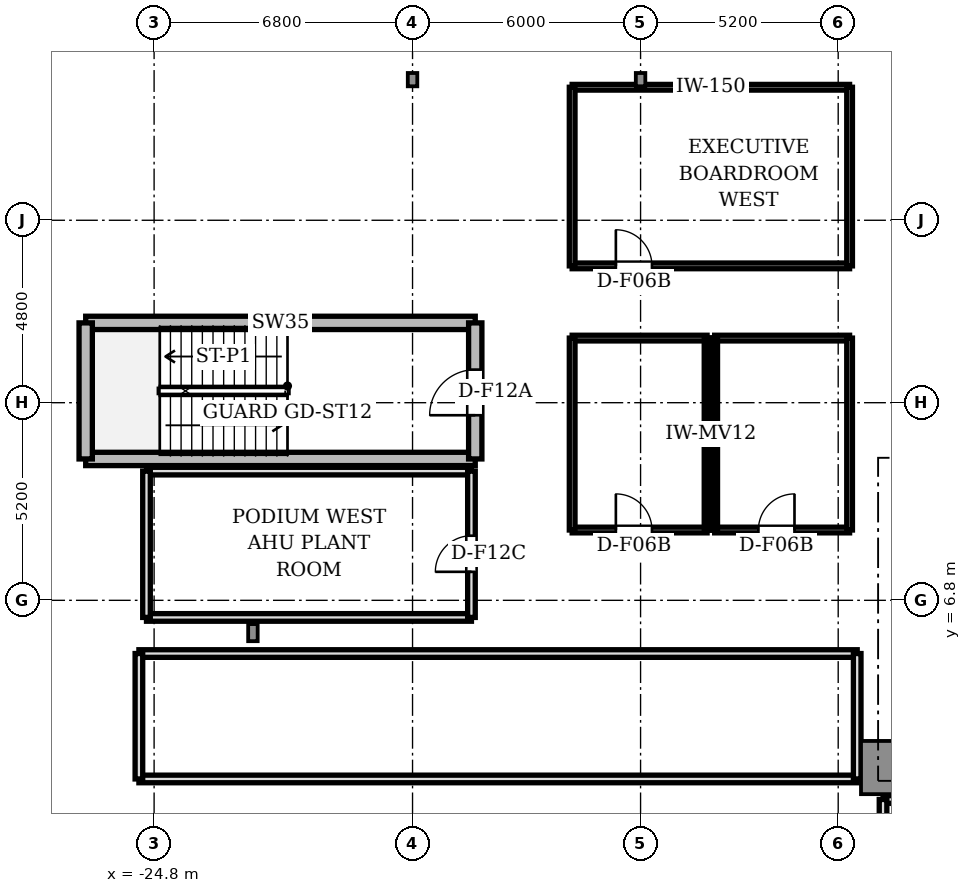
"""IFC4 building model, lengths in metres.
Left out: names, types, materials, properties, quantities, classifications, styles, units other than length and angle.
Written with IfcOpenShell. Run it as: python <this file> out.ifc"""

import sys

from ifc_helpers import new_model, si_unit, direction, frame, frame_2d, origin, origin_2d, place, context, subcontext, project, spatial, rectangle, i_section, extrude, source, transform, mapped, element, fill, save


model = new_model("IFC4")
c1 = context("Model", 3, precision=1e-05, world=origin(), true_north=direction((0.0, 1.0)))
c2 = subcontext(c1, "Body", "Model", "MODEL_VIEW")
j1 = project(units=[si_unit("LENGTHUNIT", "METRE"), si_unit("PLANEANGLEUNIT", "RADIAN")], contexts=[c1])
p1 = place(None, origin())
s1 = spatial("IfcSite", under=j1, at=p1, CompositionType="ELEMENT")
p2 = place(p1, origin())
s2 = spatial("IfcBuilding", under=s1, at=p2, CompositionType="ELEMENT")
p3 = place(p2, frame((0.0, 0.0, 14.1)))
s3 = spatial("IfcBuildingStorey", under=s2, at=p3, CompositionType="ELEMENT", Elevation=14.1)
m1 = source(origin(), c2, "Body", "SweptSolid", [
    extrude(rectangle(XDim=1.4, YDim=1.4, at=origin_2d()), origin(), (0.0, 0.0, 1.0), 4.18),
])
p4 = place(p3, frame((-5.5, 2.4, 0.0), z_axis=(0.0, 0.0, 1.0), x_axis=(1.0, 0.0, 0.0)))
e1 = element("IfcColumn", 1, at=p4, inside=s3, PredefinedType="COLUMN", context=c2, shape_type="MappedRepresentation", body=[
    mapped(m1, transform((0.0, 0.0, 0.0), scale=1.0)),
])
m2 = source(origin(), c2, "Body", "SweptSolid", [
    extrude(i_section(OverallWidth=0.25, OverallDepth=0.45, WebThickness=0.014, FlangeThickness=0.014, FilletRadius=0.015, at=origin_2d()), origin(), (0.0, 0.0, 1.0), 4.18),
])
p5 = place(p3, frame((-22.2, 5.95, 0.0), z_axis=(0.0, 0.0, 1.0), x_axis=(1.0, 0.0, 0.0)))
e2 = element("IfcColumn", 2, at=p5, inside=s3, PredefinedType="COLUMN", context=c2, shape_type="MappedRepresentation", body=[
    mapped(m2, transform((0.0, 0.0, 0.0), scale=1.0)),
])
m3 = source(origin(), c2, "Body", "SweptSolid", [
    extrude(i_section(OverallWidth=0.25, OverallDepth=0.35, WebThickness=0.012, FlangeThickness=0.012, FilletRadius=0.012, at=origin_2d()), origin(), (0.0, 0.0, 1.0), 4.18),
])
for number, where, z_axis, x_axis in (
    (3, (-18.0, 20.5, 0.0), (0.0, 0.0, 1.0), (1.0, 0.0, 0.0)),
    (4, (-12.0, 20.5, 0.0), (0.0, 0.0, 1.0), (1.0, 0.0, 0.0)),
):
    element("IfcColumn", number, at=place(p3, frame(where, z_axis=z_axis, x_axis=x_axis)), inside=s3, PredefinedType="COLUMN", context=c2, shape_type="MappedRepresentation", body=[
        mapped(m3, transform((0.0, 0.0, 0.0), scale=1.0)),
    ])
p6 = place(p3, frame((-5.62, 1.56, 0.0), z_axis=(0.0, 0.0, 1.0), x_axis=(1.0, 0.0, 0.0)))
e5 = element("IfcWall", 5, at=p6, inside=s3, PredefinedType="SOLIDWALL", context=c2, shape_type="SweptSolid", body=[
    extrude(rectangle(XDim=1.64, YDim=0.2, at=frame_2d((0.82, 0.0))), origin(), (0.0, 0.0, 1.0), 3.73),
])
p7 = place(p3, frame((-5.62, 0.0, 0.0), z_axis=(0.0, 0.0, 1.0), x_axis=(0.0, 1.0, 0.0)))
e6 = element("IfcWall", 6, at=p7, inside=s3, PredefinedType="SOLIDWALL", context=c2, shape_type="SweptSolid", body=[
    extrude(rectangle(XDim=1.56, YDim=0.2, at=frame_2d((0.78, 0.0))), origin(), (0.0, 0.0, 1.0), 3.73),
])
for number, where, z_axis, x_axis in (
    (7, (-26.6, 14.1, 0.0), (0.0, 0.0, 1.0), (1.0, 0.0, 0.0)),
    (8, (-26.6, 10.52, 0.0), (0.0, 0.0, 1.0), (1.0, 0.0, 0.0)),
):
    element("IfcWall", number, at=place(p3, frame(where, z_axis=z_axis, x_axis=x_axis)), inside=s3, PredefinedType="SHEAR", context=c2, shape_type="SweptSolid", body=[
        extrude(rectangle(XDim=10.25, YDim=0.35, at=frame_2d((5.125, 0.0))), origin(), (0.0, 0.0, 1.0), 4.18),
    ])
p8 = place(p3, frame((-26.6, 10.52, 0.0), z_axis=(0.0, 0.0, 1.0), x_axis=(0.0, 1.0, 0.0)))
e9 = element("IfcWall", 9, at=p8, inside=s3, PredefinedType="SHEAR", context=c2, shape_type="SweptSolid", body=[
    extrude(rectangle(XDim=3.58, YDim=0.35, at=frame_2d((1.79, 0.0))), origin(), (0.0, 0.0, 1.0), 4.18),
])
p9 = place(p3, frame((-16.35, 10.52, 0.0), z_axis=(0.0, 0.0, 1.0), x_axis=(0.0, 1.0, 0.0)))
e10 = element("IfcWall", 10, at=p9, inside=s3, PredefinedType="SHEAR", context=c2, shape_type="SweptSolid", body=[
    extrude(rectangle(XDim=3.58, YDim=0.35, at=frame_2d((1.79, 0.0))), origin(), (0.0, 0.0, 1.0), 4.18),
])
p10 = place(p9, frame((1.15, 0.0, 0.0)))
e11 = element("IfcOpeningElement", 11, at=p10, cuts=e10, PredefinedType="OPENING", context=c2, shape_type="SweptSolid", body=[
    extrude(rectangle(XDim=1.2, YDim=2.2, at=frame_2d((0.6, 1.1))), frame((0.0, 0.185, 0.0), z_axis=(0.0, -1.0, 0.0), x_axis=(1.0, 0.0, 0.0)), (0.0, 0.0, 1.0), 0.37),
])
for number, where, z_axis, x_axis in (
    (12, (-25.2, 5.4, 0.0), (0.0, 0.0, 1.0), (1.0, 0.0, 0.0)),
    (13, (-25.2, 2.1, 0.0), (0.0, 0.0, 1.0), (1.0, 0.0, 0.0)),
):
    element("IfcWall", number, at=place(p3, frame(where, z_axis=z_axis, x_axis=x_axis)), inside=s3, PredefinedType="SOLIDWALL", context=c2, shape_type="SweptSolid", body=[
        extrude(rectangle(XDim=18.9, YDim=0.2, at=frame_2d((9.45, 0.0))), origin(), (0.0, 0.0, 1.0), 3.25),
    ])
for number, where, z_axis, x_axis in (
    (14, (-25.2, 2.1, 0.0), (0.0, 0.0, 1.0), (0.0, 1.0, 0.0)),
    (15, (-6.3, 2.1, 0.0), (0.0, 0.0, 1.0), (0.0, 1.0, 0.0)),
):
    element("IfcWall", number, at=place(p3, frame(where, z_axis=z_axis, x_axis=x_axis)), inside=s3, PredefinedType="SOLIDWALL", context=c2, shape_type="SweptSolid", body=[
        extrude(rectangle(XDim=3.3, YDim=0.2, at=frame_2d((1.65, 0.0))), origin(), (0.0, 0.0, 1.0), 3.73),
    ])
p11 = place(p3, frame((-25.0, 10.2, 0.0), z_axis=(0.0, 0.0, 1.0), x_axis=(1.0, 0.0, 0.0)))
e16 = element("IfcWall", 16, at=p11, inside=s3, PredefinedType="SOLIDWALL", context=c2, shape_type="SweptSolid", body=[
    extrude(rectangle(XDim=8.55, YDim=0.2, at=frame_2d((4.275, 0.0))), origin(), (0.0, 0.0, 1.0), 3.73),
])
p12 = place(p3, frame((-25.0, 6.35, 0.0), z_axis=(0.0, 0.0, 1.0), x_axis=(1.0, 0.0, 0.0)))
e17 = element("IfcWall", 17, at=p12, inside=s3, PredefinedType="SOLIDWALL", context=c2, shape_type="SweptSolid", body=[
    extrude(rectangle(XDim=8.55, YDim=0.2, at=frame_2d((4.275, 0.0))), origin(), (0.0, 0.0, 1.0), 3.25),
])
p13 = place(p3, frame((-25.0, 6.35, 0.0), z_axis=(0.0, 0.0, 1.0), x_axis=(0.0, 1.0, 0.0)))
e18 = element("IfcWall", 18, at=p13, inside=s3, PredefinedType="SOLIDWALL", context=c2, shape_type="SweptSolid", body=[
    extrude(rectangle(XDim=3.85, YDim=0.2, at=frame_2d((1.925, 0.0))), origin(), (0.0, 0.0, 1.0), 3.73),
])
p14 = place(p3, frame((-16.45, 6.35, 0.0), z_axis=(0.0, 0.0, 1.0), x_axis=(0.0, 1.0, 0.0)))
e19 = element("IfcWall", 19, at=p14, inside=s3, PredefinedType="SOLIDWALL", context=c2, shape_type="SweptSolid", body=[
    extrude(rectangle(XDim=3.85, YDim=0.2, at=frame_2d((1.925, 0.0))), origin(), (0.0, 0.0, 1.0), 3.73),
])
p15 = place(p14, frame((1.2, 0.0, 0.0)))
e20 = element("IfcOpeningElement", 20, at=p15, cuts=e19, PredefinedType="OPENING", context=c2, shape_type="SweptSolid", body=[
    extrude(rectangle(XDim=0.95, YDim=2.15, at=frame_2d((0.475, 1.075))), frame((0.0, 0.11, 0.0), z_axis=(0.0, -1.0, 0.0), x_axis=(1.0, 0.0, 0.0)), (0.0, 0.0, 1.0), 0.22),
])
p16 = place(p3, frame((-13.8, 20.3, 0.0), z_axis=(0.0, 0.0, 1.0), x_axis=(1.0, 0.0, 0.0)))
e21 = element("IfcWall", 21, at=p16, inside=s3, PredefinedType="PARTITIONING", context=c2, shape_type="SweptSolid", body=[
    extrude(rectangle(XDim=7.3, YDim=0.15, at=frame_2d((3.65, 0.0))), origin(), (0.0, 0.0, 1.0), 3.65),
])
p17 = place(p3, frame((-13.8, 15.6, 0.0), z_axis=(0.0, 0.0, 1.0), x_axis=(1.0, 0.0, 0.0)))
e22 = element("IfcWall", 22, at=p17, inside=s3, PredefinedType="PARTITIONING", context=c2, shape_type="SweptSolid", body=[
    extrude(rectangle(XDim=7.3, YDim=0.15, at=frame_2d((3.65, 0.0))), origin(), (0.0, 0.0, 1.0), 3.73),
])
p18 = place(p17, frame((1.15, 0.0, 0.0)))
e23 = element("IfcOpeningElement", 23, at=p18, cuts=e22, PredefinedType="OPENING", context=c2, shape_type="SweptSolid", body=[
    extrude(rectangle(XDim=0.95, YDim=2.15, at=frame_2d((0.475, 1.075))), frame((0.0, 0.085, 0.0), z_axis=(0.0, -1.0, 0.0), x_axis=(1.0, 0.0, 0.0)), (0.0, 0.0, 1.0), 0.17),
])
for number, where, z_axis, x_axis in (
    (24, (-13.8, 15.6, 0.0), (0.0, 0.0, 1.0), (0.0, 1.0, 0.0)),
    (25, (-6.5, 15.6, 0.0), (0.0, 0.0, 1.0), (0.0, 1.0, 0.0)),
):
    element("IfcWall", number, at=place(p3, frame(where, z_axis=z_axis, x_axis=x_axis)), inside=s3, PredefinedType="PARTITIONING", context=c2, shape_type="SweptSolid", body=[
        extrude(rectangle(XDim=4.7, YDim=0.15, at=frame_2d((2.35, 0.0))), origin(), (0.0, 0.0, 1.0), 3.73),
    ])
p19 = place(p3, frame((-13.8, 13.7, 0.0), z_axis=(0.0, 0.0, 1.0), x_axis=(1.0, 0.0, 0.0)))
e26 = element("IfcWall", 26, at=p19, inside=s3, PredefinedType="PARTITIONING", context=c2, shape_type="SweptSolid", body=[
    extrude(rectangle(XDim=3.55, YDim=0.15, at=frame_2d((1.775, 0.0))), origin(), (0.0, 0.0, 1.0), 3.73),
])
p20 = place(p3, frame((-13.8, 8.65, 0.0), z_axis=(0.0, 0.0, 1.0), x_axis=(1.0, 0.0, 0.0)))
e27 = element("IfcWall", 27, at=p20, inside=s3, PredefinedType="PARTITIONING", context=c2, shape_type="SweptSolid", body=[
    extrude(rectangle(XDim=3.55, YDim=0.15, at=frame_2d((1.775, 0.0))), origin(), (0.0, 0.0, 1.0), 3.73),
])
p21 = place(p20, frame((1.15, 0.0, 0.0)))
e28 = element("IfcOpeningElement", 28, at=p21, cuts=e27, PredefinedType="OPENING", context=c2, shape_type="SweptSolid", body=[
    extrude(rectangle(XDim=0.95, YDim=2.15, at=frame_2d((0.475, 1.075))), frame((0.0, 0.085, 0.0), z_axis=(0.0, -1.0, 0.0), x_axis=(1.0, 0.0, 0.0)), (0.0, 0.0, 1.0), 0.17),
])
for number, where, z_axis, x_axis in (
    (29, (-13.8, 8.65, 0.0), (0.0, 0.0, 1.0), (0.0, 1.0, 0.0)),
    (30, (-10.25, 8.65, 0.0), (0.0, 0.0, 1.0), (0.0, 1.0, 0.0)),
):
    element("IfcWall", number, at=place(p3, frame(where, z_axis=z_axis, x_axis=x_axis)), inside=s3, PredefinedType="PARTITIONING", context=c2, shape_type="SweptSolid", body=[
        extrude(rectangle(XDim=5.05, YDim=0.15, at=frame_2d((2.525, 0.0))), origin(), (0.0, 0.0, 1.0), 3.73),
    ])
p22 = place(p3, frame((-10.05, 13.7, 0.0), z_axis=(0.0, 0.0, 1.0), x_axis=(1.0, 0.0, 0.0)))
e31 = element("IfcWall", 31, at=p22, inside=s3, PredefinedType="PARTITIONING", context=c2, shape_type="SweptSolid", body=[
    extrude(rectangle(XDim=3.55, YDim=0.15, at=frame_2d((1.775, 0.0))), origin(), (0.0, 0.0, 1.0), 3.73),
])
p23 = place(p3, frame((-10.05, 8.65, 0.0), z_axis=(0.0, 0.0, 1.0), x_axis=(1.0, 0.0, 0.0)))
e32 = element("IfcWall", 32, at=p23, inside=s3, PredefinedType="PARTITIONING", context=c2, shape_type="SweptSolid", body=[
    extrude(rectangle(XDim=3.55, YDim=0.15, at=frame_2d((1.775, 0.0))), origin(), (0.0, 0.0, 1.0), 3.73),
])
p24 = place(p23, frame((1.15, 0.0, 0.0)))
e33 = element("IfcOpeningElement", 33, at=p24, cuts=e32, PredefinedType="OPENING", context=c2, shape_type="SweptSolid", body=[
    extrude(rectangle(XDim=0.95, YDim=2.15, at=frame_2d((0.475, 1.075))), frame((0.0, 0.085, 0.0), z_axis=(0.0, -1.0, 0.0), x_axis=(1.0, 0.0, 0.0)), (0.0, 0.0, 1.0), 0.17),
])
for number, where, z_axis, x_axis in (
    (34, (-10.05, 8.65, 0.0), (0.0, 0.0, 1.0), (0.0, 1.0, 0.0)),
    (35, (-6.5, 8.65, 0.0), (0.0, 0.0, 1.0), (0.0, 1.0, 0.0)),
):
    element("IfcWall", number, at=place(p3, frame(where, z_axis=z_axis, x_axis=x_axis)), inside=s3, PredefinedType="PARTITIONING", context=c2, shape_type="SweptSolid", body=[
        extrude(rectangle(XDim=5.05, YDim=0.15, at=frame_2d((2.525, 0.0))), origin(), (0.0, 0.0, 1.0), 3.73),
    ])
p25 = place(p3, frame((-10.15, 8.65, 0.0), z_axis=(0.0, 0.0, 1.0), x_axis=(0.0, 1.0, 0.0)))
e36 = element("IfcWall", 36, at=p25, inside=s3, PredefinedType="MOVABLE", context=c2, shape_type="SweptSolid", body=[
    extrude(rectangle(XDim=5.05, YDim=0.12, at=frame_2d((2.525, 0.0))), origin(), (0.0, 0.0, 1.0), 3.73),
])
m4 = source(origin(), c2, "Body", "SweptSolid", [
    extrude(rectangle(XDim=1.2, YDim=0.05, at=origin_2d()), origin(), (0.0, 0.0, 1.0), 2.2),
])
p26 = place(p10, frame((0.6, 0.0, 0.0)))
e37 = element("IfcDoor", 37, at=p26, inside=s3, OperationType="SINGLE_SWING_LEFT", PredefinedType="DOOR", context=c2, shape_type="MappedRepresentation", body=[
    mapped(m4, transform((0.0, 0.0, 0.0), scale=1.0)),
])
fill(e11, e37)
m5 = source(origin(), c2, "Body", "SweptSolid", [
    extrude(rectangle(XDim=0.95, YDim=0.05, at=origin_2d()), origin(), (0.0, 0.0, 1.0), 2.15),
])
p27 = place(p15, frame((0.475, 0.0, 0.0)))
e38 = element("IfcDoor", 38, at=p27, inside=s3, OperationType="SINGLE_SWING_LEFT", PredefinedType="DOOR", context=c2, shape_type="MappedRepresentation", body=[
    mapped(m5, transform((0.0, 0.0, 0.0), scale=1.0)),
])
fill(e20, e38)
p28 = place(p18, frame((0.475, 0.0, 0.0)))
e39 = element("IfcDoor", 39, at=p28, inside=s3, OperationType="SINGLE_SWING_LEFT", PredefinedType="DOOR", context=c2, shape_type="MappedRepresentation", body=[
    mapped(m5, transform((0.0, 0.0, 0.0), scale=1.0)),
])
fill(e23, e39)
p29 = place(p21, frame((0.475, 0.0, 0.0)))
e40 = element("IfcDoor", 40, at=p29, inside=s3, OperationType="SINGLE_SWING_LEFT", PredefinedType="DOOR", context=c2, shape_type="MappedRepresentation", body=[
    mapped(m5, transform((0.0, 0.0, 0.0), scale=1.0)),
])
fill(e28, e40)
p30 = place(p24, frame((0.475, 0.0, 0.0)))
e41 = element("IfcDoor", 41, at=p30, inside=s3, OperationType="SINGLE_SWING_RIGHT", PredefinedType="DOOR", context=c2, shape_type="MappedRepresentation", body=[
    mapped(m5, transform((0.0, 0.0, 0.0), scale=1.0)),
])
fill(e33, e41)
save(model, sys.argv[1])
